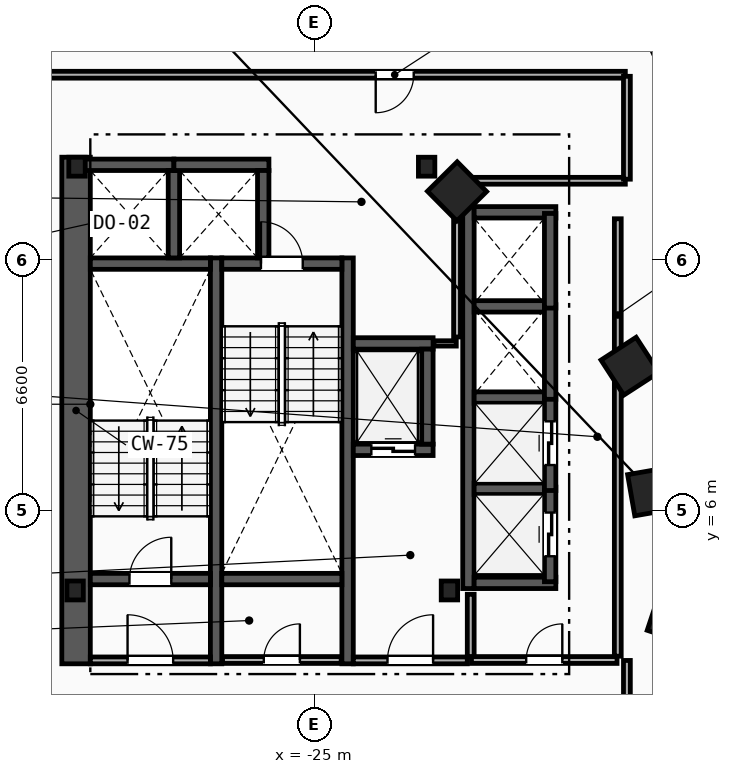
"""IFC4 building model, lengths in metres.
Left out: names, types, materials, properties, quantities, classifications, styles, units other than length and angle.
Written with IfcOpenShell. Run it as: python <this file> out.ifc"""

import sys

from ifc_helpers import new_model, si_unit, direction, frame, frame_2d, origin, origin_2d, place, context, subcontext, project, spatial, rectangle, i_section, extrude, element, fill, save


model = new_model("IFC4")
c1 = context("Model", 3, precision=1e-05, world=origin(), true_north=direction((0.0, 1.0)))
c2 = subcontext(c1, "Body", "Model", "MODEL_VIEW")
j1 = project(units=[si_unit("LENGTHUNIT", "METRE"), si_unit("PLANEANGLEUNIT", "RADIAN")], contexts=[c1])
p1 = place(None, origin())
s1 = spatial("IfcSite", under=j1, at=p1, CompositionType="ELEMENT")
p2 = place(p1, origin())
s2 = spatial("IfcBuilding", under=s1, at=p2, CompositionType="ELEMENT")
p3 = place(p2, frame((0.0, 0.0, 85.4)))
s3 = spatial("IfcBuildingStorey", under=s2, at=p3, CompositionType="ELEMENT", Elevation=85.4)
for number, where, z_axis, x_axis in (
    (1, (-31.3, 3.9, 0.0), (0.0, 0.0, 1.0), (1.0, 0.0, 0.0)),
    (2, (-21.45, 3.9, 0.0), (0.0, 0.0, 1.0), (1.0, 0.0, 0.0)),
    (3, (-22.05, 15.05, 0.0), (0.0, 0.0, 1.0), (1.0, 0.0, 0.0)),
    (4, (-31.25, 15.05, 0.0), (0.0, 0.0, 1.0), (1.0, 0.0, 0.0)),
):
    element("IfcColumn", number, at=place(p3, frame(where, z_axis=z_axis, x_axis=x_axis)), inside=s3, PredefinedType="COLUMN", context=c2, shape_type="SweptSolid", body=[
        extrude(i_section(OverallWidth=0.432, OverallDepth=0.498, WebThickness=0.056, FlangeThickness=0.089, FilletRadius=0.018, at=origin_2d()), origin(), (0.0, 0.0, 1.0), 3.6),
    ])
for number, where, z_axis, x_axis in (
    (5, (-15.55, 3.2, 0.0), (0.0, 0.0, 1.0), (0.315, 0.949, 0.0)),
    (6, (-16.125, 6.5, 0.0), (0.0, 0.0, 1.0), (-0.172, 0.985, 0.0)),
    (7, (-16.7, 9.8, 0.0), (0.0, 0.0, 1.0), (-0.544, 0.839, 0.0)),
    (8, (-21.25, 14.4, 0.0), (0.0, 0.0, 1.0), (-0.703, 0.711, 0.0)),
):
    element("IfcColumn", number, at=place(p3, frame(where, z_axis=z_axis, x_axis=x_axis)), inside=s3, PredefinedType="COLUMN", context=c2, shape_type="SweptSolid", body=[
        extrude(rectangle(XDim=1.1, YDim=1.1, at=origin_2d()), origin(), (0.0, 0.0, 1.0), 3.6),
    ])
p4 = place(p3, frame((-31.275, 1.97, 0.0), z_axis=(0.0, 0.0, 1.0), x_axis=(0.0, 1.0, 0.0)))
e9 = element("IfcWall", 9, at=p4, inside=s3, PredefinedType="SHEAR", context=c2, shape_type="SweptSolid", body=[
    extrude(rectangle(XDim=13.33, YDim=0.75, at=frame_2d((6.665, 0.0))), origin(), (0.0, 0.0, 1.0), 3.3),
])
for number, where, z_axis, x_axis in (
    (10, (-27.59, 1.97, 0.0), (0.0, 0.0, 1.0), (0.0, 1.0, 0.0)),
    (11, (-24.13, 1.97, 0.0), (0.0, 0.0, 1.0), (0.0, 1.0, 0.0)),
):
    element("IfcWall", number, at=place(p3, frame(where, z_axis=z_axis, x_axis=x_axis)), inside=s3, PredefinedType="SHEAR", context=c2, shape_type="SweptSolid", body=[
        extrude(rectangle(XDim=10.68, YDim=0.3, at=frame_2d((5.34, 0.0))), origin(), (0.0, 0.0, 1.0), 3.3),
    ])
p5 = place(p3, frame((-30.9, 4.2, 0.0), z_axis=(0.0, 0.0, 1.0), x_axis=(1.0, 0.0, 0.0)))
e12 = element("IfcWall", 12, at=p5, inside=s3, PredefinedType="SHEAR", context=c2, shape_type="SweptSolid", body=[
    extrude(rectangle(XDim=3.16, YDim=0.3, at=frame_2d((1.58, 0.0))), origin(), (0.0, 0.0, 1.0), 3.3),
])
p6 = place(p5, frame((1.03, 0.0, 0.0)))
e13 = element("IfcOpeningElement", 13, at=p6, cuts=e12, PredefinedType="OPENING", context=c2, shape_type="SweptSolid", body=[
    extrude(rectangle(XDim=1.1, YDim=2.15, at=frame_2d((0.55, 1.075))), frame((0.0, 0.16, 0.0), z_axis=(0.0, -1.0, 0.0), x_axis=(1.0, 0.0, 0.0)), (0.0, 0.0, 1.0), 0.32),
])
p7 = place(p3, frame((-30.9, 12.5, 0.0), z_axis=(0.0, 0.0, 1.0), x_axis=(1.0, 0.0, 0.0)))
e14 = element("IfcWall", 14, at=p7, inside=s3, PredefinedType="SHEAR", context=c2, shape_type="SweptSolid", body=[
    extrude(rectangle(XDim=3.16, YDim=0.3, at=frame_2d((1.58, 0.0))), origin(), (0.0, 0.0, 1.0), 3.3),
])
p8 = place(p3, frame((-27.44, 12.5, 0.0), z_axis=(0.0, 0.0, 1.0), x_axis=(1.0, 0.0, 0.0)))
e15 = element("IfcWall", 15, at=p8, inside=s3, PredefinedType="SHEAR", context=c2, shape_type="SweptSolid", body=[
    extrude(rectangle(XDim=3.16, YDim=0.3, at=frame_2d((1.58, 0.0))), origin(), (0.0, 0.0, 1.0), 3.3),
])
p9 = place(p8, frame((1.03, 0.0, 0.0)))
e16 = element("IfcOpeningElement", 16, at=p9, cuts=e15, PredefinedType="OPENING", context=c2, shape_type="SweptSolid", body=[
    extrude(rectangle(XDim=1.1, YDim=2.15, at=frame_2d((0.55, 1.075))), frame((0.0, 0.16, 0.0), z_axis=(0.0, -1.0, 0.0), x_axis=(1.0, 0.0, 0.0)), (0.0, 0.0, 1.0), 0.32),
])
p10 = place(p3, frame((-27.44, 4.2, 0.0), z_axis=(0.0, 0.0, 1.0), x_axis=(1.0, 0.0, 0.0)))
e17 = element("IfcWall", 17, at=p10, inside=s3, PredefinedType="SHEAR", context=c2, shape_type="SweptSolid", body=[
    extrude(rectangle(XDim=3.16, YDim=0.3, at=frame_2d((1.58, 0.0))), origin(), (0.0, 0.0, 1.0), 3.3),
])
p11 = place(p3, frame((-20.89, 2.15, 0.0), z_axis=(0.0, 0.0, 1.0), x_axis=(0.0, 1.0, 0.0)))
e18 = element("IfcWall", 18, at=p11, inside=s3, PredefinedType="PARTITIONING", context=c2, shape_type="SweptSolid", body=[
    extrude(rectangle(XDim=1.65, YDim=0.18, at=frame_2d((0.825, 0.0))), origin(), (0.0, 0.0, 1.0), 3.3),
])
p12 = place(p3, frame((-23.98, 2.06, 0.0), z_axis=(0.0, 0.0, 1.0), x_axis=(1.0, 0.0, 0.0)))
e19 = element("IfcWall", 19, at=p12, inside=s3, PredefinedType="PARTITIONING", context=c2, shape_type="SweptSolid", body=[
    extrude(rectangle(XDim=3.0, YDim=0.18, at=frame_2d((1.5, 0.0))), origin(), (0.0, 0.0, 1.0), 3.3),
])
p13 = place(p12, frame((0.9, 0.0, 0.0)))
e20 = element("IfcOpeningElement", 20, at=p13, cuts=e19, PredefinedType="OPENING", context=c2, shape_type="SweptSolid", body=[
    extrude(rectangle(XDim=1.2, YDim=2.15, at=frame_2d((0.6, 1.075))), frame((0.0, 0.1, 0.0), z_axis=(0.0, -1.0, 0.0), x_axis=(1.0, 0.0, 0.0)), (0.0, 0.0, 1.0), 0.2),
])
p14 = place(p3, frame((-30.9, 2.06, 0.0), z_axis=(0.0, 0.0, 1.0), x_axis=(1.0, 0.0, 0.0)))
e21 = element("IfcWall", 21, at=p14, inside=s3, PredefinedType="PARTITIONING", context=c2, shape_type="SweptSolid", body=[
    extrude(rectangle(XDim=3.16, YDim=0.18, at=frame_2d((1.58, 0.0))), origin(), (0.0, 0.0, 1.0), 3.3),
])
p15 = place(p14, frame((0.98, 0.0, 0.0)))
e22 = element("IfcOpeningElement", 22, at=p15, cuts=e21, PredefinedType="OPENING", context=c2, shape_type="SweptSolid", body=[
    extrude(rectangle(XDim=1.2, YDim=2.15, at=frame_2d((0.6, 1.075))), frame((0.0, 0.1, 0.0), z_axis=(0.0, -1.0, 0.0), x_axis=(1.0, 0.0, 0.0)), (0.0, 0.0, 1.0), 0.2),
])
p16 = place(p3, frame((-23.98, 7.6, 0.0), z_axis=(0.0, 0.0, 1.0), x_axis=(1.0, 0.0, 0.0)))
e23 = element("IfcWall", 23, at=p16, inside=s3, PredefinedType="SHEAR", context=c2, shape_type="SweptSolid", body=[
    extrude(rectangle(XDim=2.1, YDim=0.3, at=frame_2d((1.05, 0.0))), origin(), (0.0, 0.0, 1.0), 3.3),
])
p17 = place(p16, frame((0.475, 0.0, 0.0)))
e24 = element("IfcOpeningElement", 24, at=p17, cuts=e23, PredefinedType="OPENING", context=c2, shape_type="SweptSolid", body=[
    extrude(rectangle(XDim=1.15, YDim=2.2, at=frame_2d((0.575, 1.1))), frame((0.0, 0.16, 0.0), z_axis=(0.0, -1.0, 0.0), x_axis=(1.0, 0.0, 0.0)), (0.0, 0.0, 1.0), 0.32),
])
p18 = place(p3, frame((-23.98, 10.4, 0.0), z_axis=(0.0, 0.0, 1.0), x_axis=(1.0, 0.0, 0.0)))
e25 = element("IfcWall", 25, at=p18, inside=s3, PredefinedType="SHEAR", context=c2, shape_type="SweptSolid", body=[
    extrude(rectangle(XDim=2.1, YDim=0.3, at=frame_2d((1.05, 0.0))), origin(), (0.0, 0.0, 1.0), 3.3),
])
for number, where, z_axis, x_axis in (
    (26, (-22.03, 7.75, 0.0), (0.0, 0.0, 1.0), (0.0, 1.0, 0.0)),
    (27, (-31.2, 15.1, 0.0), (0.0, 0.0, 1.0), (1.0, 0.0, 0.0)),
):
    element("IfcWall", number, at=place(p3, frame(where, z_axis=z_axis, x_axis=x_axis)), inside=s3, PredefinedType="SHEAR", context=c2, shape_type="SweptSolid", body=[
        extrude(rectangle(XDim=2.5, YDim=0.3, at=frame_2d((1.25, 0.0))), origin(), (0.0, 0.0, 1.0), 3.3),
    ])
p19 = place(p3, frame((-28.7, 12.65, 0.0), z_axis=(0.0, 0.0, 1.0), x_axis=(0.0, 1.0, 0.0)))
e28 = element("IfcWall", 28, at=p19, inside=s3, PredefinedType="SHEAR", context=c2, shape_type="SweptSolid", body=[
    extrude(rectangle(XDim=2.3, YDim=0.3, at=frame_2d((1.15, 0.0))), origin(), (0.0, 0.0, 1.0), 3.3),
])
p20 = place(p3, frame((-28.7, 15.1, 0.0), z_axis=(0.0, 0.0, 1.0), x_axis=(1.0, 0.0, 0.0)))
e29 = element("IfcWall", 29, at=p20, inside=s3, PredefinedType="SHEAR", context=c2, shape_type="SweptSolid", body=[
    extrude(rectangle(XDim=2.5, YDim=0.3, at=frame_2d((1.25, 0.0))), origin(), (0.0, 0.0, 1.0), 3.3),
])
p21 = place(p3, frame((-26.35, 12.65, 0.0), z_axis=(0.0, 0.0, 1.0), x_axis=(0.0, 1.0, 0.0)))
e30 = element("IfcWall", 30, at=p21, inside=s3, PredefinedType="SHEAR", context=c2, shape_type="SweptSolid", body=[
    extrude(rectangle(XDim=2.3, YDim=0.3, at=frame_2d((1.15, 0.0))), origin(), (0.0, 0.0, 1.0), 3.3),
])
p22 = place(p3, frame((-20.95, 3.95, 0.0), z_axis=(0.0, 0.0, 1.0), x_axis=(0.0, 1.0, 0.0)))
e31 = element("IfcWall", 31, at=p22, inside=s3, PredefinedType="SHEAR", context=c2, shape_type="SweptSolid", body=[
    extrude(rectangle(XDim=10.05, YDim=0.3, at=frame_2d((5.025, 0.0))), origin(), (0.0, 0.0, 1.0), 3.3),
])
for number, where, z_axis, x_axis in (
    (32, (-20.8, 4.1, 0.0), (0.0, 0.0, 1.0), (1.0, 0.0, 0.0)),
    (33, (-20.8, 13.85, 0.0), (0.0, 0.0, 1.0), (1.0, 0.0, 0.0)),
):
    element("IfcWall", number, at=place(p3, frame(where, z_axis=z_axis, x_axis=x_axis)), inside=s3, PredefinedType="SHEAR", context=c2, shape_type="SweptSolid", body=[
        extrude(rectangle(XDim=2.15, YDim=0.3, at=frame_2d((1.075, 0.0))), origin(), (0.0, 0.0, 1.0), 3.3),
    ])
for number, where, z_axis, x_axis in (
    (34, (-20.8, 6.575, 0.0), (0.0, 0.0, 1.0), (1.0, 0.0, 0.0)),
    (35, (-20.8, 8.975, 0.0), (0.0, 0.0, 1.0), (1.0, 0.0, 0.0)),
    (36, (-20.8, 11.375, 0.0), (0.0, 0.0, 1.0), (1.0, 0.0, 0.0)),
):
    element("IfcWall", number, at=place(p3, frame(where, z_axis=z_axis, x_axis=x_axis)), inside=s3, PredefinedType="SHEAR", context=c2, shape_type="SweptSolid", body=[
        extrude(rectangle(XDim=1.85, YDim=0.3, at=frame_2d((0.925, 0.0))), origin(), (0.0, 0.0, 1.0), 3.3),
    ])
p23 = place(p3, frame((-18.8, 4.13, 0.0), z_axis=(0.0, 0.0, 1.0), x_axis=(0.0, 1.0, 0.0)))
e37 = element("IfcWall", 37, at=p23, inside=s3, PredefinedType="SHEAR", context=c2, shape_type="SweptSolid", body=[
    extrude(rectangle(XDim=2.49, YDim=0.3, at=frame_2d((1.245, 0.0))), origin(), (0.0, 0.0, 1.0), 3.3),
])
p24 = place(p23, frame((0.67, 0.0, 0.0)))
e38 = element("IfcOpeningElement", 38, at=p24, cuts=e37, PredefinedType="OPENING", context=c2, shape_type="SweptSolid", body=[
    extrude(rectangle(XDim=1.15, YDim=2.2, at=frame_2d((0.575, 1.1))), frame((0.0, 0.16, 0.0), z_axis=(0.0, -1.0, 0.0), x_axis=(1.0, 0.0, 0.0)), (0.0, 0.0, 1.0), 0.32),
])
p25 = place(p3, frame((-18.8, 6.53, 0.0), z_axis=(0.0, 0.0, 1.0), x_axis=(0.0, 1.0, 0.0)))
e39 = element("IfcWall", 39, at=p25, inside=s3, PredefinedType="SHEAR", context=c2, shape_type="SweptSolid", body=[
    extrude(rectangle(XDim=2.49, YDim=0.3, at=frame_2d((1.245, 0.0))), origin(), (0.0, 0.0, 1.0), 3.3),
])
p26 = place(p25, frame((0.67, 0.0, 0.0)))
e40 = element("IfcOpeningElement", 40, at=p26, cuts=e39, PredefinedType="OPENING", context=c2, shape_type="SweptSolid", body=[
    extrude(rectangle(XDim=1.15, YDim=2.2, at=frame_2d((0.575, 1.1))), frame((0.0, 0.16, 0.0), z_axis=(0.0, -1.0, 0.0), x_axis=(1.0, 0.0, 0.0)), (0.0, 0.0, 1.0), 0.32),
])
for number, where, z_axis, x_axis in (
    (41, (-18.8, 8.93, 0.0), (0.0, 0.0, 1.0), (0.0, 1.0, 0.0)),
    (42, (-18.8, 11.33, 0.0), (0.0, 0.0, 1.0), (0.0, 1.0, 0.0)),
):
    element("IfcWall", number, at=place(p3, frame(where, z_axis=z_axis, x_axis=x_axis)), inside=s3, PredefinedType="SHEAR", context=c2, shape_type="SweptSolid", body=[
        extrude(rectangle(XDim=2.49, YDim=0.3, at=frame_2d((1.245, 0.0))), origin(), (0.0, 0.0, 1.0), 3.3),
    ])
p27 = place(p3, frame((-17.02, 2.17, 0.0), z_axis=(0.0, 0.0, 1.0), x_axis=(0.0, 1.0, 0.0)))
e43 = element("IfcWall", 43, at=p27, inside=s3, PredefinedType="PARTITIONING", context=c2, shape_type="SweptSolid", body=[
    extrude(rectangle(XDim=11.51, YDim=0.18, at=frame_2d((5.755, 0.0))), origin(), (0.0, 0.0, 1.0), 3.3),
])
p28 = place(p3, frame((-20.87, 2.07, 0.0), z_axis=(0.0, 0.0, 1.0), x_axis=(1.0, 0.0, 0.0)))
e44 = element("IfcWall", 44, at=p28, inside=s3, PredefinedType="PARTITIONING", context=c2, shape_type="SweptSolid", body=[
    extrude(rectangle(XDim=3.83, YDim=0.18, at=frame_2d((1.915, 0.0))), origin(), (0.0, 0.0, 1.0), 3.3),
])
p29 = place(p28, frame((1.44, 0.0, 0.0)))
e45 = element("IfcOpeningElement", 45, at=p29, cuts=e44, PredefinedType="OPENING", context=c2, shape_type="SweptSolid", body=[
    extrude(rectangle(XDim=0.95, YDim=2.1, at=frame_2d((0.475, 1.05))), frame((0.0, 0.1, 0.0), z_axis=(0.0, -1.0, 0.0), x_axis=(1.0, 0.0, 0.0)), (0.0, 0.0, 1.0), 0.2),
])
p30 = place(p3, frame((-21.86, 10.4, 0.0), z_axis=(0.0, 0.0, 1.0), x_axis=(1.0, 0.0, 0.0)))
e46 = element("IfcWall", 46, at=p30, inside=s3, PredefinedType="PARTITIONING", context=c2, shape_type="SweptSolid", body=[
    extrude(rectangle(XDim=0.59, YDim=0.14, at=frame_2d((0.295, 0.0))), origin(), (0.0, 0.0, 1.0), 3.3),
])
p31 = place(p3, frame((-21.25, 10.57, 0.0), z_axis=(0.0, 0.0, 1.0), x_axis=(0.0, 1.0, 0.0)))
e47 = element("IfcWall", 47, at=p31, inside=s3, PredefinedType="PARTITIONING", context=c2, shape_type="SweptSolid", body=[
    extrude(rectangle(XDim=4.36, YDim=0.18, at=frame_2d((2.18, 0.0))), origin(), (0.0, 0.0, 1.0), 3.3),
])
p32 = place(p3, frame((-27.42, 2.07, 0.0), z_axis=(0.0, 0.0, 1.0), x_axis=(1.0, 0.0, 0.0)))
e48 = element("IfcWall", 48, at=p32, inside=s3, PredefinedType="PARTITIONING", context=c2, shape_type="SweptSolid", body=[
    extrude(rectangle(XDim=3.12, YDim=0.18, at=frame_2d((1.56, 0.0))), origin(), (0.0, 0.0, 1.0), 3.3),
])
p33 = place(p32, frame((1.085, 0.0, 0.0)))
e49 = element("IfcOpeningElement", 49, at=p33, cuts=e48, PredefinedType="OPENING", context=c2, shape_type="SweptSolid", body=[
    extrude(rectangle(XDim=0.95, YDim=2.1, at=frame_2d((0.475, 1.05))), frame((0.0, 0.1, 0.0), z_axis=(0.0, -1.0, 0.0), x_axis=(1.0, 0.0, 0.0)), (0.0, 0.0, 1.0), 0.2),
])
p34 = place(p3, frame((-16.822, 17.47, 0.0), z_axis=(0.0, 0.0, 1.0), x_axis=(-1.0, 0.0, 0.0)))
e50 = element("IfcWall", 50, at=p34, inside=s3, PredefinedType="PARTITIONING", context=c2, shape_type="SweptSolid", body=[
    extrude(rectangle(XDim=16.807, YDim=0.18, at=frame_2d((8.403, 0.0))), origin(), (0.0, 0.0, 1.0), 3.3),
])
p35 = place(p34, frame((5.569, 0.0, 0.0)))
e51 = element("IfcOpeningElement", 51, at=p35, cuts=e50, PredefinedType="OPENING", context=c2, shape_type="SweptSolid", body=[
    extrude(rectangle(XDim=1.0, YDim=2.15, at=frame_2d((0.5, 1.075))), frame((0.0, 0.1, 0.0), z_axis=(0.0, -1.0, 0.0), x_axis=(1.0, 0.0, 0.0)), (0.0, 0.0, 1.0), 0.2),
])
p36 = place(p3, frame((-21.178, 14.68, 0.0), z_axis=(0.0, 0.0, 1.0), x_axis=(1.0, 0.0, 0.0)))
e52 = element("IfcWall", 52, at=p36, inside=s3, PredefinedType="PARTITIONING", context=c2, shape_type="SweptSolid", body=[
    extrude(rectangle(XDim=4.357, YDim=0.18, at=frame_2d((2.178, 0.0))), origin(), (0.0, 0.0, 1.0), 3.3),
])
p37 = place(p3, frame((-16.78, 14.721, 0.0), z_axis=(0.0, 0.0, 1.0), x_axis=(0.0, 1.0, 0.0)))
e53 = element("IfcWall", 53, at=p37, inside=s3, PredefinedType="PARTITIONING", context=c2, shape_type="SweptSolid", body=[
    extrude(rectangle(XDim=2.707, YDim=0.18, at=frame_2d((1.354, 0.0))), origin(), (0.0, 0.0, 1.0), 3.3),
])
p38 = place(p3, frame((-16.78, -0.329, 0.0), z_axis=(0.0, 0.0, 1.0), x_axis=(0.0, 1.0, 0.0)))
e54 = element("IfcWall", 54, at=p38, inside=s3, PredefinedType="PARTITIONING", context=c2, shape_type="SweptSolid", body=[
    extrude(rectangle(XDim=2.387, YDim=0.18, at=frame_2d((1.194, 0.0))), origin(), (0.0, 0.0, 1.0), 3.3),
])
p39 = place(p6, origin())
e55 = element("IfcDoor", 55, at=p39, inside=s3, OperationType="SINGLE_SWING_RIGHT", PredefinedType="DOOR", context=c2, shape_type="SweptSolid", body=[
    extrude(rectangle(XDim=1.1, YDim=2.15, at=frame_2d((0.55, 1.075))), frame((0.0, 0.025, 0.0), z_axis=(0.0, -1.0, 0.0), x_axis=(1.0, 0.0, 0.0)), (0.0, 0.0, 1.0), 0.05),
])
fill(e13, e55)
p40 = place(p9, origin())
e56 = element("IfcDoor", 56, at=p40, inside=s3, OperationType="SINGLE_SWING_LEFT", PredefinedType="DOOR", context=c2, shape_type="SweptSolid", body=[
    extrude(rectangle(XDim=1.1, YDim=2.15, at=frame_2d((0.55, 1.075))), frame((0.0, 0.025, 0.0), z_axis=(0.0, -1.0, 0.0), x_axis=(1.0, 0.0, 0.0)), (0.0, 0.0, 1.0), 0.05),
])
fill(e16, e56)
p41 = place(p13, origin())
e57 = element("IfcDoor", 57, at=p41, inside=s3, OperationType="SINGLE_SWING_RIGHT", PredefinedType="DOOR", context=c2, shape_type="SweptSolid", body=[
    extrude(rectangle(XDim=1.2, YDim=2.15, at=frame_2d((0.6, 1.075))), frame((0.0, 0.025, 0.0), z_axis=(0.0, -1.0, 0.0), x_axis=(1.0, 0.0, 0.0)), (0.0, 0.0, 1.0), 0.05),
])
fill(e20, e57)
p42 = place(p15, origin())
e58 = element("IfcDoor", 58, at=p42, inside=s3, OperationType="SINGLE_SWING_LEFT", PredefinedType="DOOR", context=c2, shape_type="SweptSolid", body=[
    extrude(rectangle(XDim=1.2, YDim=2.15, at=frame_2d((0.6, 1.075))), frame((0.0, 0.025, 0.0), z_axis=(0.0, -1.0, 0.0), x_axis=(1.0, 0.0, 0.0)), (0.0, 0.0, 1.0), 0.05),
])
fill(e22, e58)
p43 = place(p17, origin())
e59 = element("IfcDoor", 59, at=p43, inside=s3, OperationType="SLIDING_TO_LEFT", PredefinedType="TRAPDOOR", context=c2, shape_type="SweptSolid", body=[
    extrude(rectangle(XDim=1.15, YDim=2.2, at=frame_2d((0.575, 1.1))), frame((0.0, 0.025, 0.0), z_axis=(0.0, -1.0, 0.0), x_axis=(1.0, 0.0, 0.0)), (0.0, 0.0, 1.0), 0.05),
])
fill(e24, e59)
p44 = place(p24, origin())
e60 = element("IfcDoor", 60, at=p44, inside=s3, OperationType="SLIDING_TO_LEFT", PredefinedType="TRAPDOOR", context=c2, shape_type="SweptSolid", body=[
    extrude(rectangle(XDim=1.15, YDim=2.2, at=frame_2d((0.575, 1.1))), frame((0.0, 0.025, 0.0), z_axis=(0.0, -1.0, 0.0), x_axis=(1.0, 0.0, 0.0)), (0.0, 0.0, 1.0), 0.05),
])
fill(e38, e60)
p45 = place(p26, origin())
e61 = element("IfcDoor", 61, at=p45, inside=s3, OperationType="SLIDING_TO_LEFT", PredefinedType="TRAPDOOR", context=c2, shape_type="SweptSolid", body=[
    extrude(rectangle(XDim=1.15, YDim=2.2, at=frame_2d((0.575, 1.1))), frame((0.0, 0.025, 0.0), z_axis=(0.0, -1.0, 0.0), x_axis=(1.0, 0.0, 0.0)), (0.0, 0.0, 1.0), 0.05),
])
fill(e40, e61)
p46 = place(p35, origin())
e62 = element("IfcDoor", 62, at=p46, inside=s3, OperationType="SINGLE_SWING_RIGHT", PredefinedType="DOOR", context=c2, shape_type="SweptSolid", body=[
    extrude(rectangle(XDim=1.0, YDim=2.15, at=frame_2d((0.5, 1.075))), frame((0.0, 0.025, 0.0), z_axis=(0.0, -1.0, 0.0), x_axis=(1.0, 0.0, 0.0)), (0.0, 0.0, 1.0), 0.05),
])
fill(e51, e62)
p47 = place(p29, origin())
e63 = element("IfcDoor", 63, at=p47, inside=s3, OperationType="SINGLE_SWING_RIGHT", PredefinedType="DOOR", context=c2, shape_type="SweptSolid", body=[
    extrude(rectangle(XDim=0.95, YDim=2.1, at=frame_2d((0.475, 1.05))), frame((0.0, 0.025, 0.0), z_axis=(0.0, -1.0, 0.0), x_axis=(1.0, 0.0, 0.0)), (0.0, 0.0, 1.0), 0.05),
])
fill(e45, e63)
p48 = place(p33, origin())
e64 = element("IfcDoor", 64, at=p48, inside=s3, OperationType="SINGLE_SWING_RIGHT", PredefinedType="DOOR", context=c2, shape_type="SweptSolid", body=[
    extrude(rectangle(XDim=0.95, YDim=2.1, at=frame_2d((0.475, 1.05))), frame((0.0, 0.025, 0.0), z_axis=(0.0, -1.0, 0.0), x_axis=(1.0, 0.0, 0.0)), (0.0, 0.0, 1.0), 0.05),
])
fill(e49, e64)
save(model, sys.argv[1])
